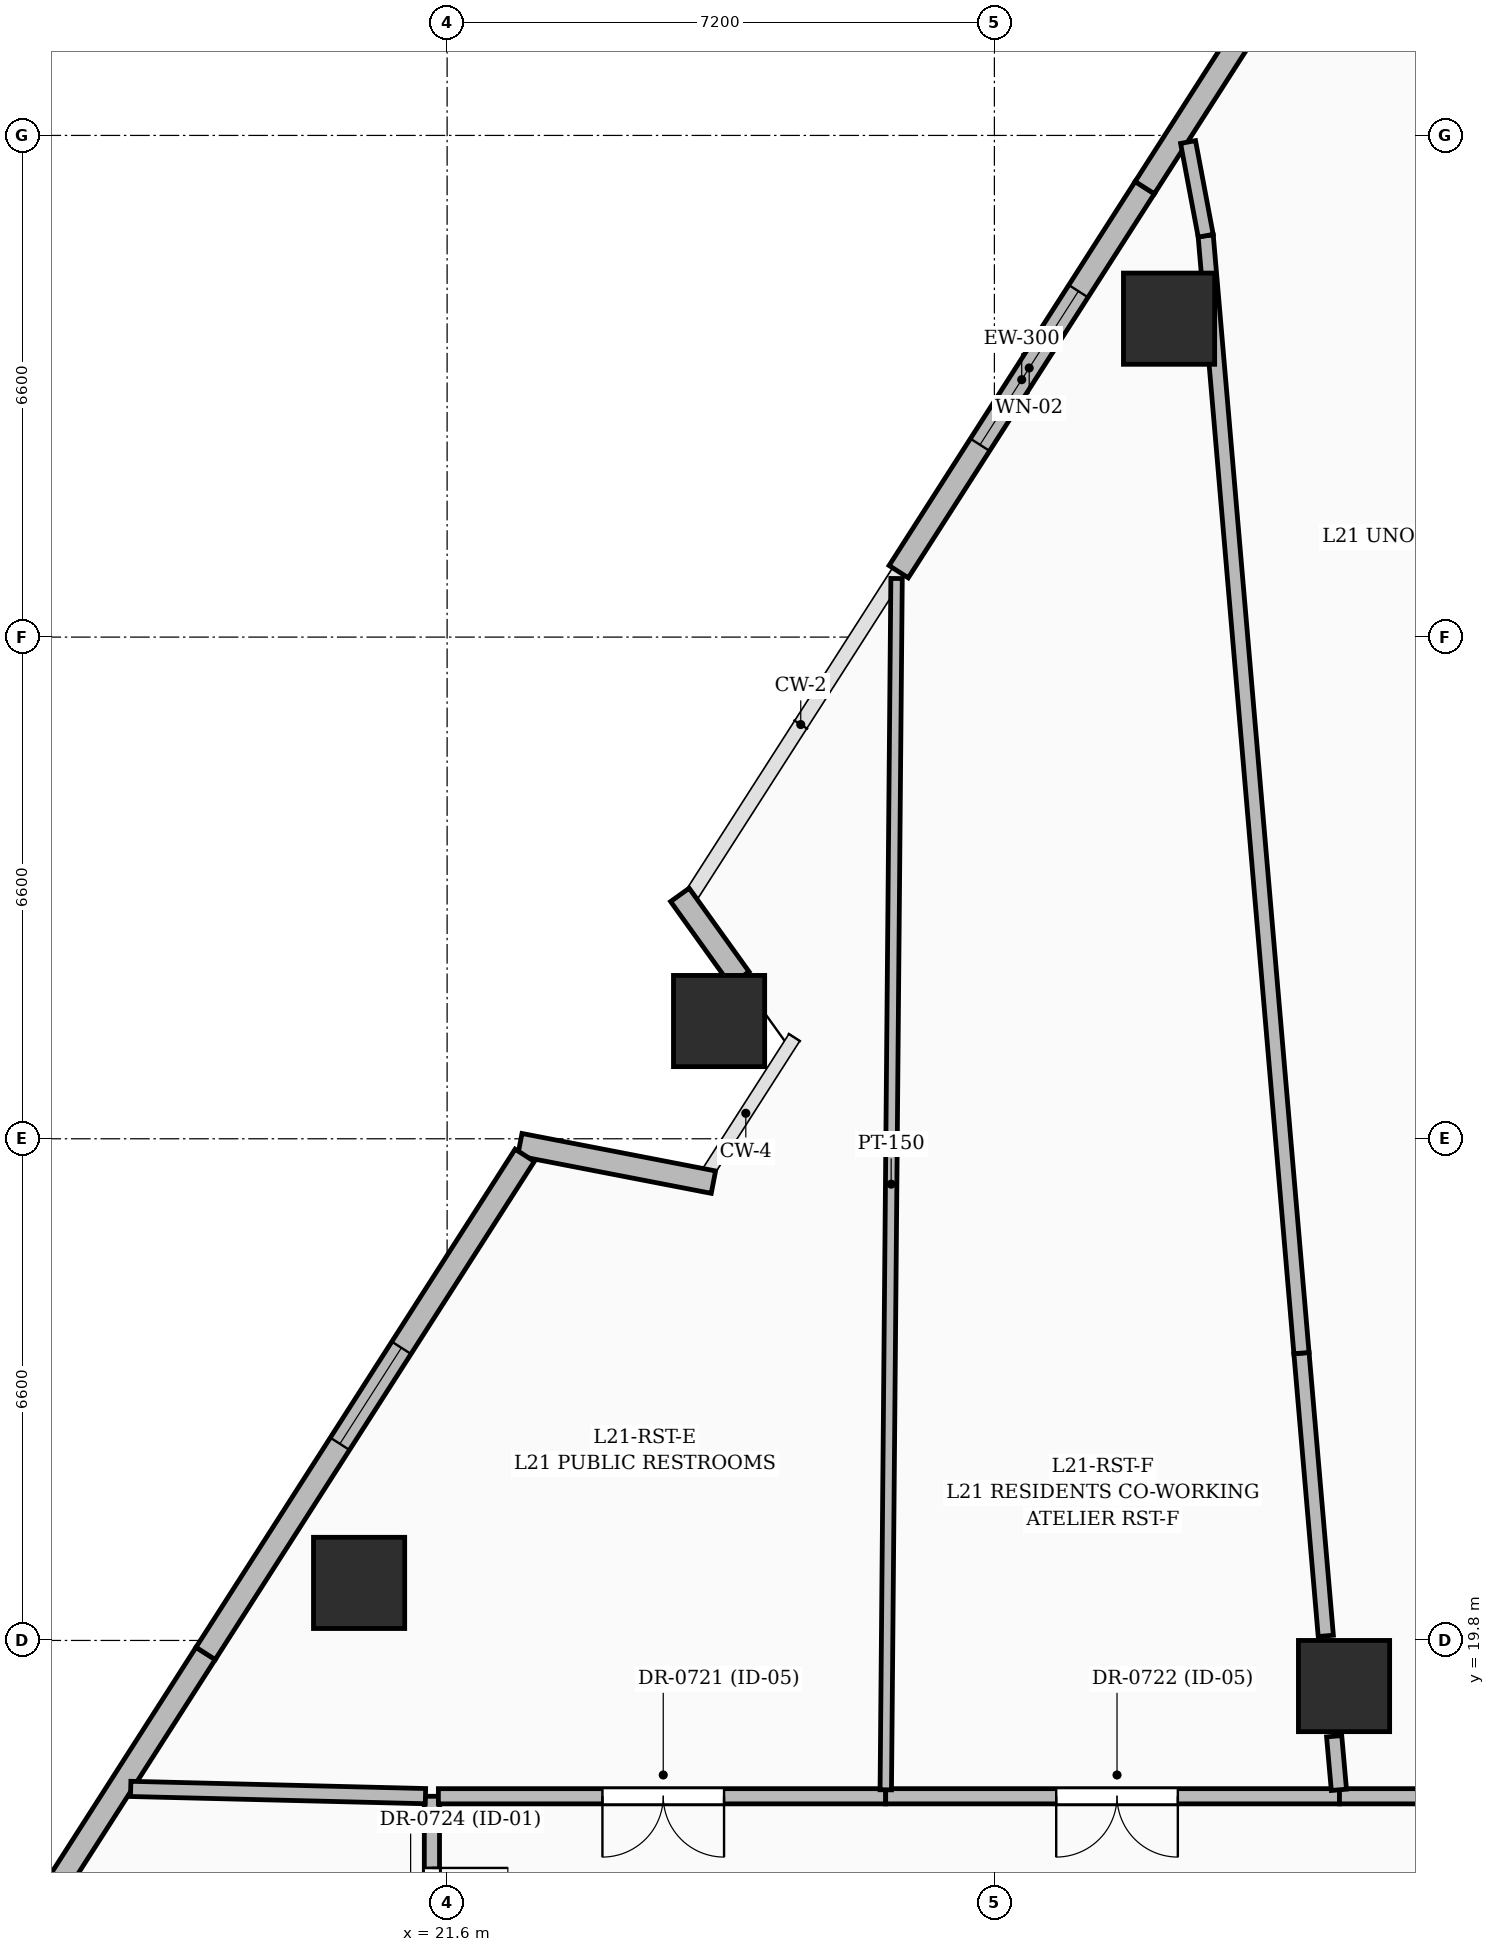
"""IFC4 building model, lengths in metres.
Left out: names, types, materials, properties, quantities, classifications, styles, units other than length and angle.
Written with IfcOpenShell. Run it as: python <this file> out.ifc"""

import sys

from ifc_helpers import new_model, si_unit, direction, frame, frame_2d, origin, origin_2d, place, context, subcontext, project, spatial, rectangle, extrude, element, fill, save


model = new_model("IFC4")
c1 = context("Model", 3, precision=1e-05, world=origin(), true_north=direction((0.0, 1.0)))
c2 = subcontext(c1, "Body", "Model", "MODEL_VIEW")
j1 = project(units=[si_unit("LENGTHUNIT", "METRE"), si_unit("PLANEANGLEUNIT", "RADIAN")], contexts=[c1])
p1 = place(None, origin())
s1 = spatial("IfcSite", under=j1, at=p1, CompositionType="ELEMENT")
p2 = place(p1, origin())
s2 = spatial("IfcBuilding", under=s1, at=p2, CompositionType="ELEMENT")
p3 = place(p2, frame((0.0, 0.0, 85.8)))
s3 = spatial("IfcBuildingStorey", under=s2, at=p3, CompositionType="ELEMENT", Elevation=85.8)
for number, where, z_axis, x_axis in (
    (1, (33.4, 19.2, 0.0), (0.0, 0.0, 1.0), (1.0, 0.0, 0.0)),
    (2, (31.098, 37.189, 0.0), (0.0, 0.0, 1.0), (1.0, 0.0, 0.0)),
    (3, (25.178, 27.949, 0.0), (0.0, 0.0, 1.0), (1.0, 0.0, 0.0)),
    (4, (20.442, 20.557, 0.0), (0.0, 0.0, 1.0), (1.0, 0.0, 0.0)),
):
    element("IfcColumn", number, at=place(p3, frame(where, z_axis=z_axis, x_axis=x_axis)), inside=s3, PredefinedType="COLUMN", context=c2, shape_type="SweptSolid", body=[
        extrude(rectangle(XDim=1.2, YDim=1.2, at=origin_2d()), origin(), (0.0, 0.0, 1.0), 3.6),
    ])
p4 = place(p3, frame((22.557, 26.323, 0.0), z_axis=(0.0, 0.0, 1.0), x_axis=(0.98176398898, -0.190103839891, 0.0)))
e5 = element("IfcWall", 5, at=p4, inside=s3, PredefinedType="SOLIDWALL", context=c2, shape_type="SweptSolid", body=[
    extrude(rectangle(XDim=2.594, YDim=0.3, at=frame_2d((1.297, 0.0))), origin(), (0.0, 0.0, 1.0), 2.375),
])
p5 = place(p3, frame((25.45, 28.511, 0.0), z_axis=(0.0, 0.0, 1.0), x_axis=(-0.583099772648, 0.812400550922, 0.0)))
e6 = element("IfcWall", 6, at=p5, inside=s3, PredefinedType="SOLIDWALL", context=c2, shape_type="SweptSolid", body=[
    extrude(rectangle(XDim=1.351, YDim=0.3, at=frame_2d((0.676, 0.0))), origin(), (0.0, 0.0, 1.0), 2.375),
])
p6 = place(p3, frame((27.541, 33.861, 0.0), z_axis=(0.0, 0.0, 1.0), x_axis=(0.53946350035, 0.842008985576, 0.0)))
e7 = element("IfcWall", 7, at=p6, inside=s3, PredefinedType="SOLIDWALL", context=c2, shape_type="SweptSolid", body=[
    extrude(rectangle(XDim=6.0, YDim=0.3, at=frame_2d((3.0, 0.0))), origin(), (0.0, 0.0, 1.0), 3.35),
])
p7 = place(p6, frame((1.983, 0.0, 0.6)))
e8 = element("IfcOpeningElement", 8, at=p7, cuts=e7, PredefinedType="OPENING", context=c2, shape_type="SweptSolid", body=[
    extrude(rectangle(XDim=2.4, YDim=2.1, at=frame_2d((1.2, 1.05))), frame((0.0, 0.16, 0.0), z_axis=(0.0, -1.0, 0.0), x_axis=(1.0, 0.0, 0.0)), (0.0, 0.0, 1.0), 0.32),
])
p8 = place(p3, frame((30.778, 38.913, 0.0), z_axis=(0.0, 0.0, 1.0), x_axis=(0.53944633572, 0.842019982469, 0.0)))
e9 = element("IfcWall", 9, at=p8, inside=s3, PredefinedType="SOLIDWALL", context=c2, shape_type="SweptSolid", body=[
    extrude(rectangle(XDim=5.593, YDim=0.3, at=frame_2d((2.796, 0.0))), origin(), (0.0, 0.0, 1.0), 3.35),
])
p9 = place(p3, frame((14.076, 12.845, 0.0), z_axis=(0.0, 0.0, 1.0), x_axis=(0.539449144613, 0.842018182925, 0.0)))
e10 = element("IfcWall", 10, at=p9, inside=s3, PredefinedType="SOLIDWALL", context=c2, shape_type="SweptSolid", body=[
    extrude(rectangle(XDim=8.058, YDim=0.3, at=frame_2d((4.029, 0.0))), origin(), (0.0, 0.0, 1.0), 3.35),
])
p10 = place(p3, frame((18.423, 19.629, 0.0), z_axis=(0.0, 0.0, 1.0), x_axis=(0.539448885301, 0.842018349056, 0.0)))
e11 = element("IfcWall", 11, at=p10, inside=s3, PredefinedType="SOLIDWALL", context=c2, shape_type="SweptSolid", body=[
    extrude(rectangle(XDim=7.782, YDim=0.3, at=frame_2d((3.891, 0.0))), origin(), (0.0, 0.0, 1.0), 3.35),
])
p11 = place(p10, frame((3.275, 0.0, 0.6)))
e12 = element("IfcOpeningElement", 12, at=p11, cuts=e11, PredefinedType="OPENING", context=c2, shape_type="SweptSolid", body=[
    extrude(rectangle(XDim=1.5, YDim=2.1, at=frame_2d((0.75, 1.05))), frame((0.0, 0.16, 0.0), z_axis=(0.0, -1.0, 0.0), x_axis=(1.0, 0.0, 0.0)), (0.0, 0.0, 1.0), 0.32),
])
p12 = place(p3, frame((21.4, 17.75, 0.0), z_axis=(0.0, 0.0, 1.0), x_axis=(0.0, -1.0, 0.0)))
e13 = element("IfcWall", 13, at=p12, inside=s3, PredefinedType="PARTITIONING", context=c2, shape_type="SweptSolid", body=[
    extrude(rectangle(XDim=3.0, YDim=0.2, at=frame_2d((1.5, 0.0))), origin(), (0.0, 0.0, 1.0), 2.712),
])
p13 = place(p12, frame((0.943, 0.0, 0.0)))
e14 = element("IfcOpeningElement", 14, at=p13, cuts=e13, PredefinedType="OPENING", context=c2, shape_type="SweptSolid", body=[
    extrude(rectangle(XDim=1.0, YDim=2.2, at=frame_2d((0.5, 1.1))), frame((0.0, 0.11, 0.0), z_axis=(0.0, -1.0, 0.0), x_axis=(1.0, 0.0, 0.0)), (0.0, 0.0, 1.0), 0.22),
])
p14 = place(p3, frame((27.37, 17.75, 0.0), z_axis=(0.0, 0.0, 1.0), x_axis=(-1.0, 0.0, 0.0)))
e15 = element("IfcWall", 15, at=p14, inside=s3, PredefinedType="PARTITIONING", context=c2, shape_type="SweptSolid", body=[
    extrude(rectangle(XDim=5.885, YDim=0.2, at=frame_2d((2.942, 0.0))), origin(), (0.0, 0.0, 1.0), 2.345),
])
p15 = place(p14, frame((2.127, 0.0, 0.0)))
e16 = element("IfcOpeningElement", 16, at=p15, cuts=e15, PredefinedType="OPENING", context=c2, shape_type="SweptSolid", body=[
    extrude(rectangle(XDim=1.6, YDim=2.3, at=frame_2d((0.8, 1.15))), frame((0.0, 0.11, 0.0), z_axis=(0.0, -1.0, 0.0), x_axis=(1.0, 0.0, 0.0)), (0.0, 0.0, 1.0), 0.22),
])
p16 = place(p3, frame((33.34, 17.75, 0.0), z_axis=(0.0, 0.0, 1.0), x_axis=(-1.0, 0.0, 0.0)))
e17 = element("IfcWall", 17, at=p16, inside=s3, PredefinedType="PARTITIONING", context=c2, shape_type="SweptSolid", body=[
    extrude(rectangle(XDim=5.97, YDim=0.2, at=frame_2d((2.985, 0.0))), origin(), (0.0, 0.0, 1.0), 3.35),
])
p17 = place(p16, frame((2.127, 0.0, 0.0)))
e18 = element("IfcOpeningElement", 18, at=p17, cuts=e17, PredefinedType="OPENING", context=c2, shape_type="SweptSolid", body=[
    extrude(rectangle(XDim=1.6, YDim=2.3, at=frame_2d((0.8, 1.15))), frame((0.0, 0.11, 0.0), z_axis=(0.0, -1.0, 0.0), x_axis=(1.0, 0.0, 0.0)), (0.0, 0.0, 1.0), 0.22),
])
p18 = place(p3, frame((34.57, 17.75, 0.0), z_axis=(0.0, 0.0, 1.0), x_axis=(-1.0, 0.0, 0.0)))
e19 = element("IfcWall", 19, at=p18, inside=s3, PredefinedType="PARTITIONING", context=c2, shape_type="SweptSolid", body=[
    extrude(rectangle(XDim=1.23, YDim=0.2, at=frame_2d((0.615, 0.0))), origin(), (0.0, 0.0, 1.0), 2.309),
])
p19 = place(p3, frame((21.315, 17.752, 0.0), z_axis=(0.0, 0.0, 1.0), x_axis=(-0.999698711084, 0.024545611768, 0.0)))
e20 = element("IfcWall", 20, at=p19, inside=s3, PredefinedType="PARTITIONING", context=c2, shape_type="SweptSolid", body=[
    extrude(rectangle(XDim=3.879, YDim=0.2, at=frame_2d((1.939, 0.0))), origin(), (0.0, 0.0, 1.0), 2.37),
])
p20 = place(p3, frame((27.371, 17.835, 0.0), z_axis=(0.0, 0.0, 1.0), x_axis=(0.008900588075, 0.999960388981, 0.0)))
e21 = element("IfcWall", 21, at=p20, inside=s3, PredefinedType="PARTITIONING", context=c2, shape_type="SweptSolid", body=[
    extrude(rectangle(XDim=15.937, YDim=0.15, at=frame_2d((7.968, 0.0))), origin(), (0.0, 0.0, 1.0), 2.345),
])
p21 = place(p3, frame((33.16, 19.86, 0.0), z_axis=(0.0, 0.0, 1.0), x_axis=(-0.08565893025, 0.996324519255, 0.0)))
e22 = element("IfcWall", 22, at=p21, inside=s3, PredefinedType="PARTITIONING", context=c2, shape_type="SweptSolid", body=[
    extrude(rectangle(XDim=3.734, YDim=0.2, at=frame_2d((1.867, 0.0))), origin(), (0.0, 0.0, 1.0), 3.35),
])
p22 = place(p3, frame((33.333, 17.835, 0.0), z_axis=(0.0, 0.0, 1.0), x_axis=(-0.08826611765, 0.996096929257, 0.0)))
e23 = element("IfcWall", 23, at=p22, inside=s3, PredefinedType="PARTITIONING", context=c2, shape_type="SweptSolid", body=[
    extrude(rectangle(XDim=0.708, YDim=0.2, at=frame_2d((0.354, 0.0))), origin(), (0.0, 0.0, 1.0), 3.35),
])
p23 = place(p3, frame((32.84, 23.58, 0.0), z_axis=(0.0, 0.0, 1.0), x_axis=(-0.085402080026, 0.996346568583, 0.0)))
e24 = element("IfcWall", 24, at=p23, inside=s3, PredefinedType="PARTITIONING", context=c2, shape_type="SweptSolid", body=[
    extrude(rectangle(XDim=14.754, YDim=0.2, at=frame_2d((7.377, 0.0))), origin(), (0.0, 0.0, 1.0), 2.345),
])
p24 = place(p3, frame((31.58, 38.28, 0.0), z_axis=(0.0, 0.0, 1.0), x_axis=(-0.185063937558, 0.982726482301, 0.0)))
e25 = element("IfcWall", 25, at=p24, inside=s3, PredefinedType="PARTITIONING", context=c2, shape_type="SweptSolid", body=[
    extrude(rectangle(XDim=1.255, YDim=0.2, at=frame_2d((0.627, 0.0))), origin(), (0.0, 0.0, 1.0), 3.35),
])
p25 = place(p7, origin())
e26 = element("IfcWindow", 26, at=p25, inside=s3, PartitioningType="SINGLE_PANEL", PredefinedType="WINDOW", context=c2, shape_type="SweptSolid", body=[
    extrude(rectangle(XDim=2.4, YDim=2.1, at=frame_2d((1.2, 1.05))), frame((0.0, 0.03, 0.0), z_axis=(0.0, -1.0, 0.0), x_axis=(1.0, 0.0, 0.0)), (0.0, 0.0, 1.0), 0.06),
])
fill(e8, e26)
p26 = place(p11, origin())
e27 = element("IfcWindow", 27, at=p26, inside=s3, PartitioningType="SINGLE_PANEL", PredefinedType="WINDOW", context=c2, shape_type="SweptSolid", body=[
    extrude(rectangle(XDim=1.5, YDim=2.1, at=frame_2d((0.75, 1.05))), frame((0.0, 0.03, 0.0), z_axis=(0.0, -1.0, 0.0), x_axis=(1.0, 0.0, 0.0)), (0.0, 0.0, 1.0), 0.06),
])
fill(e12, e27)
p27 = place(p15, origin())
e28 = element("IfcDoor", 28, at=p27, inside=s3, OperationType="DOUBLE_DOOR_SINGLE_SWING", PredefinedType="DOOR", context=c2, shape_type="SweptSolid", body=[
    extrude(rectangle(XDim=1.6, YDim=2.3, at=frame_2d((0.8, 1.15))), frame((0.0, 0.025, 0.0), z_axis=(0.0, -1.0, 0.0), x_axis=(1.0, 0.0, 0.0)), (0.0, 0.0, 1.0), 0.05),
])
fill(e16, e28)
p28 = place(p17, origin())
e29 = element("IfcDoor", 29, at=p28, inside=s3, OperationType="DOUBLE_DOOR_SINGLE_SWING", PredefinedType="DOOR", context=c2, shape_type="SweptSolid", body=[
    extrude(rectangle(XDim=1.6, YDim=2.3, at=frame_2d((0.8, 1.15))), frame((0.0, 0.025, 0.0), z_axis=(0.0, -1.0, 0.0), x_axis=(1.0, 0.0, 0.0)), (0.0, 0.0, 1.0), 0.05),
])
fill(e18, e29)
p29 = place(p13, origin())
e30 = element("IfcDoor", 30, at=p29, inside=s3, OperationType="SINGLE_SWING_LEFT", PredefinedType="DOOR", context=c2, shape_type="SweptSolid", body=[
    extrude(rectangle(XDim=1.0, YDim=2.2, at=frame_2d((0.5, 1.1))), frame((0.0, 0.025, 0.0), z_axis=(0.0, -1.0, 0.0), x_axis=(1.0, 0.0, 0.0)), (0.0, 0.0, 1.0), 0.05),
])
fill(e14, e30)
save(model, sys.argv[1])
